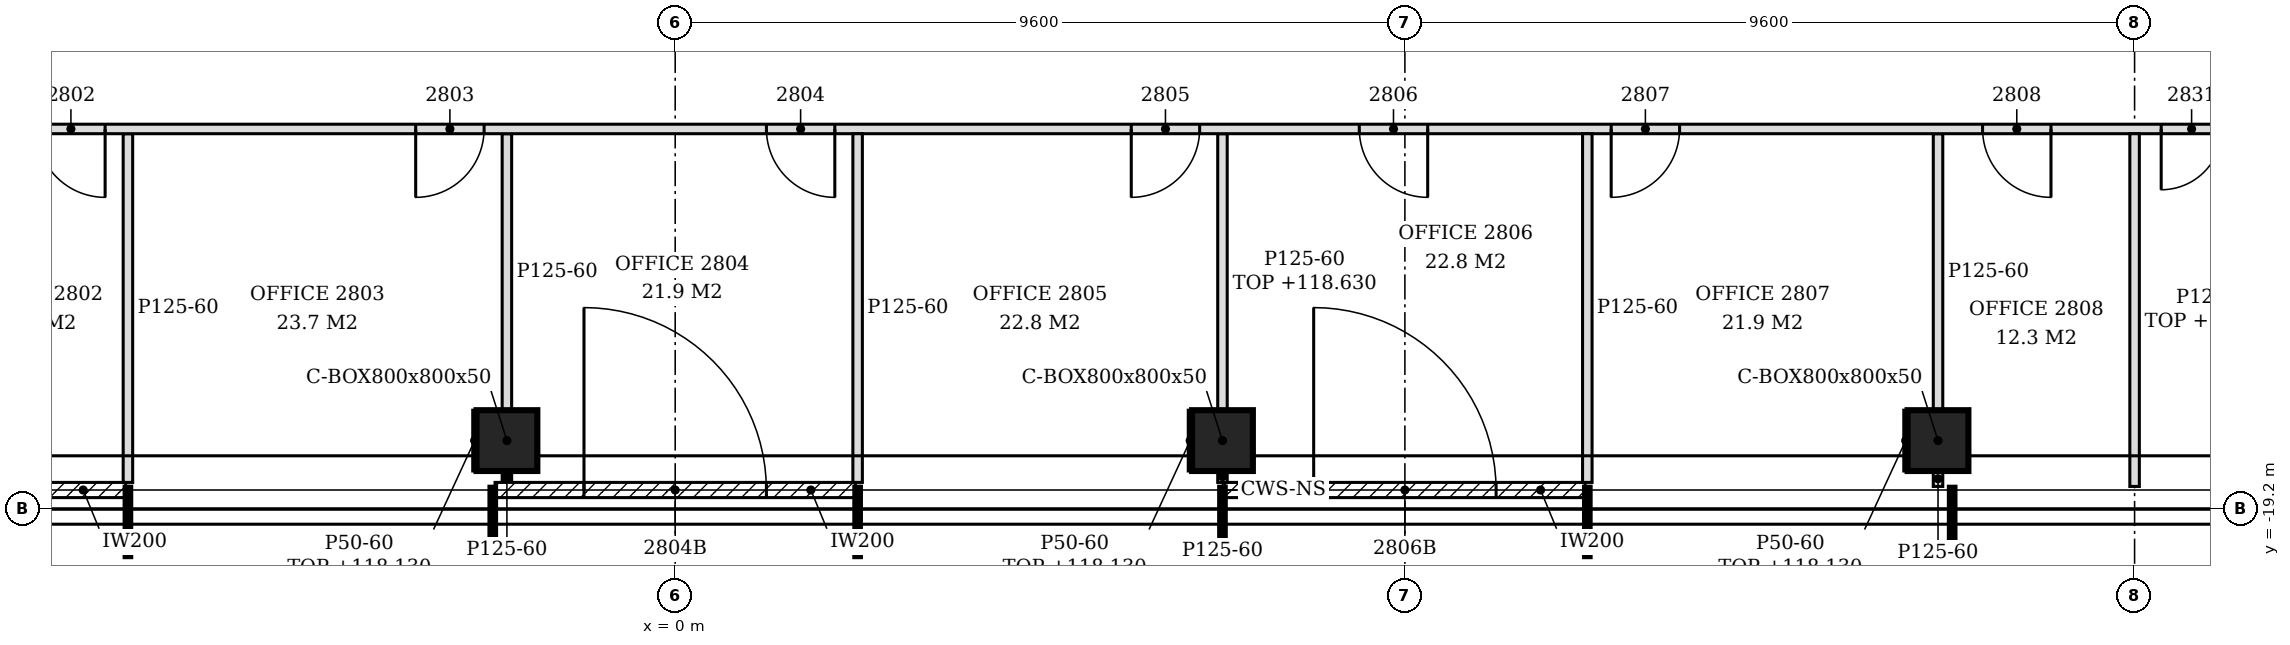
"""IFC4 building model, lengths in metres.
Left out: names, types, materials, properties, quantities, classifications, styles, units other than length and angle.
Written with IfcOpenShell. Run it as: python <this file> out.ifc"""

import sys

from ifc_helpers import new_model, si_unit, direction, frame, frame_2d, origin, origin_2d, place, context, subcontext, project, spatial, polyline, rectangle, hollow_rectangle, outline, extrude, clip, halfspace, element, fill, save


model = new_model("IFC4")
c1 = context("Model", 3, precision=1e-05, world=origin(), true_north=direction((0.0, 1.0)))
c2 = subcontext(c1, "Body", "Model", "MODEL_VIEW")
j1 = project(units=[si_unit("LENGTHUNIT", "METRE"), si_unit("PLANEANGLEUNIT", "RADIAN")], contexts=[c1])
p1 = place(None, origin())
s1 = spatial("IfcSite", under=j1, at=p1, CompositionType="ELEMENT")
p2 = place(p1, origin())
s2 = spatial("IfcBuilding", under=s1, at=p2, CompositionType="ELEMENT")
p3 = place(p2, frame((0.0, 0.0, 115.8)))
s3 = spatial("IfcBuildingStorey", under=s2, at=p3, CompositionType="ELEMENT", Elevation=115.8)
p4 = place(p3, frame((-2.214, -18.3, -0.15), z_axis=(0.0, 0.0, 1.0), x_axis=(1.0, 0.0, 0.0)))
e1 = element("IfcColumn", 1, at=p4, inside=s3, PredefinedType="COLUMN", context=c2, shape_type="Clipping", body=[
    clip(clip(extrude(hollow_rectangle(XDim=0.8, YDim=0.8, WallThickness=0.05, at=origin_2d()), origin(), (0.0, 0.0, 1.0), 3.5), halfspace(frame((0.0, 0.0, 0.021), z_axis=(0.0, 0.0, 1.0), x_axis=(1.0, 0.0, 0.0)), True)), halfspace(frame((0.0, 0.0, 3.05), z_axis=(0.0, 0.0, 1.0), x_axis=(1.0, 0.0, 0.0)), False)),
])
p5 = place(p3, frame((7.2, -18.3, -0.15), z_axis=(0.0, 0.0, 1.0), x_axis=(1.0, 0.0, 0.0)))
e2 = element("IfcColumn", 2, at=p5, inside=s3, PredefinedType="COLUMN", context=c2, shape_type="Clipping", body=[
    clip(extrude(hollow_rectangle(XDim=0.8, YDim=0.8, WallThickness=0.05, at=origin_2d()), origin(), (0.0, 0.0, 1.0), 3.5), halfspace(frame((0.0, 0.0, 0.021), z_axis=(0.0, 0.0, 1.0), x_axis=(1.0, 0.0, 0.0)), True)),
])
p6 = place(p3, frame((16.614, -18.3, -0.15), z_axis=(0.0, 0.0, 1.0), x_axis=(1.0, 0.0, 0.0)))
e3 = element("IfcColumn", 3, at=p6, inside=s3, PredefinedType="COLUMN", context=c2, shape_type="Clipping", body=[
    clip(clip(extrude(hollow_rectangle(XDim=0.8, YDim=0.8, WallThickness=0.05, at=origin_2d()), origin(), (0.0, 0.0, 1.0), 3.5), halfspace(frame((0.0, 0.0, 0.021), z_axis=(0.0, 0.0, 1.0), x_axis=(1.0, 0.0, 0.0)), True)), halfspace(frame((0.0, 0.0, 3.05), z_axis=(0.0, 0.0, 1.0), x_axis=(1.0, 0.0, 0.0)), False)),
])
p7 = place(p3, frame((-11.856, -18.95, 0.0), z_axis=(0.0, 0.0, 1.0), x_axis=(1.0, 0.0, 0.0)))
e4 = element("IfcWall", 4, at=p7, inside=s3, PredefinedType="NOTDEFINED", context=c2, shape_type="SweptSolid", body=[
    extrude(rectangle(XDim=4.626, YDim=0.2, at=frame_2d((2.313, 0.0))), origin(), (0.0, 0.0, 1.0), 3.35),
])
p8 = place(p7, frame((1.108, 0.0, 0.0)))
e5 = element("IfcOpeningElement", 5, at=p8, cuts=e4, PredefinedType="OPENING", context=c2, shape_type="SweptSolid", body=[
    extrude(rectangle(XDim=2.4, YDim=2.4, at=frame_2d((1.2, 1.2))), frame((0.0, 0.11, 0.0), z_axis=(0.0, -1.0, 0.0), x_axis=(1.0, 0.0, 0.0)), (0.0, 0.0, 1.0), 0.22),
])
p9 = place(p3, frame((-2.37, -18.95, 0.0), z_axis=(0.0, 0.0, 1.0), x_axis=(1.0, 0.0, 0.0)))
e6 = element("IfcWall", 6, at=p9, inside=s3, PredefinedType="NOTDEFINED", context=c2, shape_type="SweptSolid", body=[
    extrude(rectangle(XDim=4.74, YDim=0.2, at=frame_2d((2.37, 0.0))), origin(), (0.0, 0.0, 1.0), 3.35),
])
p10 = place(p9, frame((1.17, 0.0, 0.0)))
e7 = element("IfcOpeningElement", 7, at=p10, cuts=e6, PredefinedType="OPENING", context=c2, shape_type="SweptSolid", body=[
    extrude(rectangle(XDim=2.4, YDim=2.4, at=frame_2d((1.2, 1.2))), frame((0.0, 0.11, 0.0), z_axis=(0.0, -1.0, 0.0), x_axis=(1.0, 0.0, 0.0)), (0.0, 0.0, 1.0), 0.22),
])
p11 = place(p3, frame((7.23, -18.95, 0.0), z_axis=(0.0, 0.0, 1.0), x_axis=(1.0, 0.0, 0.0)))
e8 = element("IfcWall", 8, at=p11, inside=s3, PredefinedType="NOTDEFINED", context=c2, shape_type="SweptSolid", body=[
    extrude(rectangle(XDim=4.74, YDim=0.2, at=frame_2d((2.37, 0.0))), origin(), (0.0, 0.0, 1.0), 3.35),
])
p12 = place(p11, frame((1.17, 0.0, 0.0)))
e9 = element("IfcOpeningElement", 9, at=p12, cuts=e8, PredefinedType="OPENING", context=c2, shape_type="SweptSolid", body=[
    extrude(rectangle(XDim=2.4, YDim=2.4, at=frame_2d((1.2, 1.2))), frame((0.0, 0.11, 0.0), z_axis=(0.0, -1.0, 0.0), x_axis=(1.0, 0.0, 0.0)), (0.0, 0.0, 1.0), 0.22),
])
p13 = place(p3, frame((-7.2, -18.85, 0.0), z_axis=(0.0, 0.0, 1.0), x_axis=(0.0, 1.0, 0.0)))
e10 = element("IfcWall", 10, at=p13, inside=s3, PredefinedType="PARTITIONING", context=c2, shape_type="SweptSolid", body=[
    extrude(outline(polyline([(0.0, 0.0), (4.588, 0.0), (4.587, 3.35), (4.55, 3.35), (4.548, 2.83), (4.35, 2.83), (4.348, 3.35), (1.05, 3.35), (1.048, 2.33), (0.05, 2.33), (0.048, 3.35), (0.0, 3.35), (0.0, 0.0)])), frame((0.0, 0.062, 0.0), z_axis=(0.0, -1.0, 0.0), x_axis=(1.0, 0.0, 0.0)), (0.0, 0.0, 1.0), 0.125),
])
p14 = place(p3, frame((2.4, -18.85, 0.0), z_axis=(0.0, 0.0, 1.0), x_axis=(0.0, 1.0, 0.0)))
e11 = element("IfcWall", 11, at=p14, inside=s3, PredefinedType="PARTITIONING", context=c2, shape_type="SweptSolid", body=[
    extrude(outline(polyline([(0.0, 0.0), (4.588, 0.0), (4.587, 3.35), (4.555, 3.35), (4.553, 2.78), (4.345, 2.78), (4.343, 3.35), (1.05, 3.35), (1.048, 2.33), (0.05, 2.33), (0.048, 3.35), (0.0, 3.35), (0.0, 0.0)])), frame((0.0, 0.062, 0.0), z_axis=(0.0, -1.0, 0.0), x_axis=(1.0, 0.0, 0.0)), (0.0, 0.0, 1.0), 0.125),
])
p15 = place(p3, frame((7.2, -18.85, 0.0), z_axis=(0.0, 0.0, 1.0), x_axis=(0.0, 1.0, 0.0)))
e12 = element("IfcWall", 12, at=p15, inside=s3, PredefinedType="PARTITIONING", context=c2, shape_type="SweptSolid", body=[
    extrude(outline(polyline([(0.0, 0.0), (0.15, 0.0), (0.15, 2.33), (0.05, 2.33), (0.048, 3.35), (0.0, 3.35), (0.0, 0.0)])), frame((0.0, 0.062, 0.0), z_axis=(0.0, -1.0, 0.0), x_axis=(1.0, 0.0, 0.0)), (0.0, 0.0, 1.0), 0.125),
])
p16 = place(p3, frame((12.0, -18.85, 0.0), z_axis=(0.0, 0.0, 1.0), x_axis=(0.0, 1.0, 0.0)))
e13 = element("IfcWall", 13, at=p16, inside=s3, PredefinedType="PARTITIONING", context=c2, shape_type="SweptSolid", body=[
    extrude(outline(polyline([(0.0, 0.0), (4.588, 0.0), (4.587, 3.35), (4.555, 3.35), (4.553, 2.78), (4.345, 2.78), (4.343, 3.35), (1.05, 3.35), (1.048, 2.33), (0.05, 2.33), (0.048, 3.35), (0.0, 3.35), (0.0, 0.0)])), frame((0.0, 0.062, 0.0), z_axis=(0.0, -1.0, 0.0), x_axis=(1.0, 0.0, 0.0)), (0.0, 0.0, 1.0), 0.125),
])
p17 = place(p3, frame((16.614, -18.903, 0.0), z_axis=(0.0, 0.0, 1.0), x_axis=(0.0, 1.0, 0.0)))
e14 = element("IfcWall", 14, at=p17, inside=s3, PredefinedType="PARTITIONING", context=c2, shape_type="SweptSolid", body=[
    extrude(outline(polyline([(0.0, 0.0), (0.203, 0.0), (0.203, 2.33), (0.103, 2.33), (0.101, 3.35), (0.0, 3.35), (0.0, 0.0)])), frame((0.0, 0.062, 0.0), z_axis=(0.0, -1.0, 0.0), x_axis=(1.0, 0.0, 0.0)), (0.0, 0.0, 1.0), 0.125),
])
p18 = place(p3, frame((19.2, -18.903, 0.0), z_axis=(0.0, 0.0, 1.0), x_axis=(0.0, 1.0, 0.0)))
e15 = element("IfcWall", 15, at=p18, inside=s3, PredefinedType="PARTITIONING", context=c2, shape_type="SweptSolid", body=[
    extrude(rectangle(XDim=4.641, YDim=0.125, at=frame_2d((2.32, 0.0))), origin(), (0.0, 0.0, 1.0), 2.322),
])
p19 = place(p3, frame((-2.214, -18.82, 0.0), z_axis=(0.0, 0.0, 1.0), x_axis=(0.0, 1.0, 0.0)))
e16 = element("IfcWall", 16, at=p19, inside=s3, PredefinedType="PARTITIONING", context=c2, shape_type="SweptSolid", body=[
    extrude(outline(polyline([(0.0, 0.0), (0.12, 0.0), (0.12, 2.33), (0.02, 2.33), (0.018, 3.35), (0.0, 3.35), (0.0, 0.0)])), frame((0.0, 0.062, 0.0), z_axis=(0.0, -1.0, 0.0), x_axis=(1.0, 0.0, 0.0)), (0.0, 0.0, 1.0), 0.125),
])
p20 = place(p3, frame((-2.214, -17.9, 0.0), z_axis=(0.0, 0.0, 1.0), x_axis=(0.0, 1.0, 0.0)))
e17 = element("IfcWall", 17, at=p20, inside=s3, PredefinedType="PARTITIONING", context=c2, shape_type="SweptSolid", body=[
    extrude(outline(polyline([(0.0, 0.0), (3.637, 0.0), (3.637, 3.35), (3.605, 3.35), (3.603, 2.78), (3.395, 2.78), (3.393, 3.35), (0.1, 3.35), (0.098, 2.33), (0.0, 2.33), (0.0, 0.0)])), frame((0.0, 0.062, 0.0), z_axis=(0.0, -1.0, 0.0), x_axis=(1.0, 0.0, 0.0)), (0.0, 0.0, 1.0), 0.125),
])
p21 = place(p3, frame((7.2, -17.9, 0.0), z_axis=(0.0, 0.0, 1.0), x_axis=(0.0, 1.0, 0.0)))
e18 = element("IfcWall", 18, at=p21, inside=s3, PredefinedType="PARTITIONING", context=c2, shape_type="SweptSolid", body=[
    extrude(outline(polyline([(0.0, 0.0), (3.637, 0.0), (3.637, 2.83), (0.1, 2.83), (0.098, 2.33), (0.0, 2.33), (0.0, 0.0)])), frame((0.0, 0.062, 0.0), z_axis=(0.0, -1.0, 0.0), x_axis=(1.0, 0.0, 0.0)), (0.0, 0.0, 1.0), 0.125),
])
p22 = place(p3, frame((16.614, -17.9, 0.0), z_axis=(0.0, 0.0, 1.0), x_axis=(0.0, 1.0, 0.0)))
e19 = element("IfcWall", 19, at=p22, inside=s3, PredefinedType="PARTITIONING", context=c2, shape_type="SweptSolid", body=[
    extrude(outline(polyline([(0.0, 0.0), (3.637, 0.0), (3.637, 3.35), (3.605, 3.35), (3.603, 2.78), (3.395, 2.78), (3.393, 3.35), (0.1, 3.35), (0.098, 2.33), (0.0, 2.33), (0.0, 0.0)])), frame((0.0, 0.062, 0.0), z_axis=(0.0, -1.0, 0.0), x_axis=(1.0, 0.0, 0.0)), (0.0, 0.0, 1.0), 0.125),
])
p23 = place(p3, frame((-14.4, -14.2, 0.0), z_axis=(0.0, 0.0, 1.0), x_axis=(1.0, 0.0, 0.0)))
e20 = element("IfcWall", 20, at=p23, inside=s3, PredefinedType="PARTITIONING", context=c2, shape_type="SweptSolid", body=[
    extrude(outline(polyline([(0.0, 0.0), (41.887, 0.0), (41.887, 3.35), (33.751, 3.35), (33.749, 2.322), (33.449, 2.322), (33.447, 3.35), (21.75, 3.35), (21.748, 2.83), (21.45, 2.83), (21.448, 3.35), (9.75, 3.35), (9.748, 2.83), (9.45, 2.83), (9.448, 3.35), (0.15, 3.35), (0.148, 2.93), (0.0, 2.93), (0.0, 0.0)])), frame((0.0, 0.062, 0.0), z_axis=(0.0, -1.0, 0.0), x_axis=(1.0, 0.0, 0.0)), (0.0, 0.0, 1.0), 0.125),
])
p24 = place(p23, frame((1.3, 0.0, 0.0)))
e21 = element("IfcOpeningElement", 21, at=p24, cuts=e20, PredefinedType="OPENING", context=c2, shape_type="SweptSolid", body=[
    extrude(rectangle(XDim=0.8, YDim=2.1, at=frame_2d((0.4, 1.05))), frame((0.0, 0.073, 0.0), z_axis=(0.0, -1.0, 0.0), x_axis=(1.0, 0.0, 0.0)), (0.0, 0.0, 1.0), 0.145),
])
p25 = place(p23, frame((6.0, 0.0, 0.0)))
e22 = element("IfcOpeningElement", 22, at=p25, cuts=e20, PredefinedType="OPENING", context=c2, shape_type="SweptSolid", body=[
    extrude(rectangle(XDim=0.9, YDim=2.1, at=frame_2d((0.45, 1.05))), frame((0.0, 0.073, 0.0), z_axis=(0.0, -1.0, 0.0), x_axis=(1.0, 0.0, 0.0)), (0.0, 0.0, 1.0), 0.145),
])
p26 = place(p23, frame((10.986, 0.0, 0.0)))
e23 = element("IfcOpeningElement", 23, at=p26, cuts=e20, PredefinedType="OPENING", context=c2, shape_type="SweptSolid", body=[
    extrude(rectangle(XDim=0.9, YDim=2.1, at=frame_2d((0.45, 1.05))), frame((0.0, 0.073, 0.0), z_axis=(0.0, -1.0, 0.0), x_axis=(1.0, 0.0, 0.0)), (0.0, 0.0, 1.0), 0.145),
])
p27 = place(p23, frame((15.6, 0.0, 0.0)))
e24 = element("IfcOpeningElement", 24, at=p27, cuts=e20, PredefinedType="OPENING", context=c2, shape_type="SweptSolid", body=[
    extrude(rectangle(XDim=0.9, YDim=2.1, at=frame_2d((0.45, 1.05))), frame((0.0, 0.073, 0.0), z_axis=(0.0, -1.0, 0.0), x_axis=(1.0, 0.0, 0.0)), (0.0, 0.0, 1.0), 0.145),
])
p28 = place(p23, frame((20.4, 0.0, 0.0)))
e25 = element("IfcOpeningElement", 25, at=p28, cuts=e20, PredefinedType="OPENING", context=c2, shape_type="SweptSolid", body=[
    extrude(rectangle(XDim=0.9, YDim=2.1, at=frame_2d((0.45, 1.05))), frame((0.0, 0.073, 0.0), z_axis=(0.0, -1.0, 0.0), x_axis=(1.0, 0.0, 0.0)), (0.0, 0.0, 1.0), 0.145),
])
p29 = place(p23, frame((23.4, 0.0, 0.0)))
e26 = element("IfcOpeningElement", 26, at=p29, cuts=e20, PredefinedType="OPENING", context=c2, shape_type="SweptSolid", body=[
    extrude(rectangle(XDim=0.9, YDim=2.1, at=frame_2d((0.45, 1.05))), frame((0.0, 0.073, 0.0), z_axis=(0.0, -1.0, 0.0), x_axis=(1.0, 0.0, 0.0)), (0.0, 0.0, 1.0), 0.145),
])
p30 = place(p23, frame((26.714, 0.0, 0.0)))
e27 = element("IfcOpeningElement", 27, at=p30, cuts=e20, PredefinedType="OPENING", context=c2, shape_type="SweptSolid", body=[
    extrude(rectangle(XDim=0.9, YDim=2.1, at=frame_2d((0.45, 1.05))), frame((0.0, 0.073, 0.0), z_axis=(0.0, -1.0, 0.0), x_axis=(1.0, 0.0, 0.0)), (0.0, 0.0, 1.0), 0.145),
])
p31 = place(p23, frame((31.6, 0.0, 0.0)))
e28 = element("IfcOpeningElement", 28, at=p31, cuts=e20, PredefinedType="OPENING", context=c2, shape_type="SweptSolid", body=[
    extrude(rectangle(XDim=0.9, YDim=2.1, at=frame_2d((0.45, 1.05))), frame((0.0, 0.073, 0.0), z_axis=(0.0, -1.0, 0.0), x_axis=(1.0, 0.0, 0.0)), (0.0, 0.0, 1.0), 0.145),
])
p32 = place(p23, frame((33.95, 0.0, 0.0)))
e29 = element("IfcOpeningElement", 29, at=p32, cuts=e20, PredefinedType="OPENING", context=c2, shape_type="SweptSolid", body=[
    extrude(rectangle(XDim=0.8, YDim=2.1, at=frame_2d((0.4, 1.05))), frame((0.0, 0.073, 0.0), z_axis=(0.0, -1.0, 0.0), x_axis=(1.0, 0.0, 0.0)), (0.0, 0.0, 1.0), 0.145),
])
for number, where, z_axis, x_axis in (
    (30, (6.775, -18.7, 0.0), (0.0, 0.0, 1.0), (0.0, 1.0, 0.0)),
    (31, (16.189, -18.7, 0.0), (0.0, 0.0, 1.0), (0.0, 1.0, 0.0)),
    (32, (-2.639, -18.7, 0.0), (0.0, 0.0, 1.0), (0.0, 1.0, 0.0)),
):
    element("IfcWall", number, at=place(p3, frame(where, z_axis=z_axis, x_axis=x_axis)), inside=s3, PredefinedType="PARTITIONING", context=c2, shape_type="SweptSolid", body=[
        extrude(rectangle(XDim=0.8, YDim=0.05, at=frame_2d((0.4, 0.0))), origin(), (0.0, 0.0, 1.0), 2.33),
    ])
p33 = place(p10, origin())
e33 = element("IfcDoor", 33, at=p33, inside=s3, OperationType="SINGLE_SWING_LEFT", PredefinedType="DOOR", context=c2, shape_type="SweptSolid", body=[
    extrude(rectangle(XDim=2.4, YDim=2.4, at=frame_2d((1.2, 1.2))), frame((0.0, 0.025, 0.0), z_axis=(0.0, -1.0, 0.0), x_axis=(1.0, 0.0, 0.0)), (0.0, 0.0, 1.0), 0.05),
])
fill(e7, e33)
p34 = place(p12, origin())
e34 = element("IfcDoor", 34, at=p34, inside=s3, OperationType="SINGLE_SWING_LEFT", PredefinedType="DOOR", context=c2, shape_type="SweptSolid", body=[
    extrude(rectangle(XDim=2.4, YDim=2.4, at=frame_2d((1.2, 1.2))), frame((0.0, 0.025, 0.0), z_axis=(0.0, -1.0, 0.0), x_axis=(1.0, 0.0, 0.0)), (0.0, 0.0, 1.0), 0.05),
])
fill(e9, e34)
p35 = place(p25, frame((0.9, 0.0, 0.0), z_axis=(0.0, 0.0, 1.0), x_axis=(-1.0, 0.0, 0.0)))
e35 = element("IfcDoor", 35, at=p35, inside=s3, OperationType="SINGLE_SWING_LEFT", PredefinedType="DOOR", context=c2, shape_type="SweptSolid", body=[
    extrude(rectangle(XDim=0.9, YDim=2.1, at=frame_2d((0.45, 1.05))), frame((0.0, 0.025, 0.0), z_axis=(0.0, -1.0, 0.0), x_axis=(1.0, 0.0, 0.0)), (0.0, 0.0, 1.0), 0.05),
])
fill(e22, e35)
p36 = place(p26, frame((0.9, 0.0, 0.0), z_axis=(0.0, 0.0, 1.0), x_axis=(-1.0, 0.0, 0.0)))
e36 = element("IfcDoor", 36, at=p36, inside=s3, OperationType="SINGLE_SWING_RIGHT", PredefinedType="DOOR", context=c2, shape_type="SweptSolid", body=[
    extrude(rectangle(XDim=0.9, YDim=2.1, at=frame_2d((0.45, 1.05))), frame((0.0, 0.025, 0.0), z_axis=(0.0, -1.0, 0.0), x_axis=(1.0, 0.0, 0.0)), (0.0, 0.0, 1.0), 0.05),
])
fill(e23, e36)
p37 = place(p27, frame((0.9, 0.0, 0.0), z_axis=(0.0, 0.0, 1.0), x_axis=(-1.0, 0.0, 0.0)))
e37 = element("IfcDoor", 37, at=p37, inside=s3, OperationType="SINGLE_SWING_LEFT", PredefinedType="DOOR", context=c2, shape_type="SweptSolid", body=[
    extrude(rectangle(XDim=0.9, YDim=2.1, at=frame_2d((0.45, 1.05))), frame((0.0, 0.025, 0.0), z_axis=(0.0, -1.0, 0.0), x_axis=(1.0, 0.0, 0.0)), (0.0, 0.0, 1.0), 0.05),
])
fill(e24, e37)
p38 = place(p28, frame((0.9, 0.0, 0.0), z_axis=(0.0, 0.0, 1.0), x_axis=(-1.0, 0.0, 0.0)))
e38 = element("IfcDoor", 38, at=p38, inside=s3, OperationType="SINGLE_SWING_RIGHT", PredefinedType="DOOR", context=c2, shape_type="SweptSolid", body=[
    extrude(rectangle(XDim=0.9, YDim=2.1, at=frame_2d((0.45, 1.05))), frame((0.0, 0.025, 0.0), z_axis=(0.0, -1.0, 0.0), x_axis=(1.0, 0.0, 0.0)), (0.0, 0.0, 1.0), 0.05),
])
fill(e25, e38)
p39 = place(p29, frame((0.9, 0.0, 0.0), z_axis=(0.0, 0.0, 1.0), x_axis=(-1.0, 0.0, 0.0)))
e39 = element("IfcDoor", 39, at=p39, inside=s3, OperationType="SINGLE_SWING_LEFT", PredefinedType="DOOR", context=c2, shape_type="SweptSolid", body=[
    extrude(rectangle(XDim=0.9, YDim=2.1, at=frame_2d((0.45, 1.05))), frame((0.0, 0.025, 0.0), z_axis=(0.0, -1.0, 0.0), x_axis=(1.0, 0.0, 0.0)), (0.0, 0.0, 1.0), 0.05),
])
fill(e26, e39)
p40 = place(p30, frame((0.9, 0.0, 0.0), z_axis=(0.0, 0.0, 1.0), x_axis=(-1.0, 0.0, 0.0)))
e40 = element("IfcDoor", 40, at=p40, inside=s3, OperationType="SINGLE_SWING_RIGHT", PredefinedType="DOOR", context=c2, shape_type="SweptSolid", body=[
    extrude(rectangle(XDim=0.9, YDim=2.1, at=frame_2d((0.45, 1.05))), frame((0.0, 0.025, 0.0), z_axis=(0.0, -1.0, 0.0), x_axis=(1.0, 0.0, 0.0)), (0.0, 0.0, 1.0), 0.05),
])
fill(e27, e40)
p41 = place(p31, frame((0.9, 0.0, 0.0), z_axis=(0.0, 0.0, 1.0), x_axis=(-1.0, 0.0, 0.0)))
e41 = element("IfcDoor", 41, at=p41, inside=s3, OperationType="SINGLE_SWING_LEFT", PredefinedType="DOOR", context=c2, shape_type="SweptSolid", body=[
    extrude(rectangle(XDim=0.9, YDim=2.1, at=frame_2d((0.45, 1.05))), frame((0.0, 0.025, 0.0), z_axis=(0.0, -1.0, 0.0), x_axis=(1.0, 0.0, 0.0)), (0.0, 0.0, 1.0), 0.05),
])
fill(e28, e41)
p42 = place(p32, frame((0.8, 0.0, 0.0), z_axis=(0.0, 0.0, 1.0), x_axis=(-1.0, 0.0, 0.0)))
e42 = element("IfcDoor", 42, at=p42, inside=s3, OperationType="SINGLE_SWING_RIGHT", PredefinedType="DOOR", context=c2, shape_type="SweptSolid", body=[
    extrude(rectangle(XDim=0.8, YDim=2.1, at=frame_2d((0.4, 1.05))), frame((0.0, 0.025, 0.0), z_axis=(0.0, -1.0, 0.0), x_axis=(1.0, 0.0, 0.0)), (0.0, 0.0, 1.0), 0.05),
])
fill(e29, e42)
save(model, sys.argv[1])
